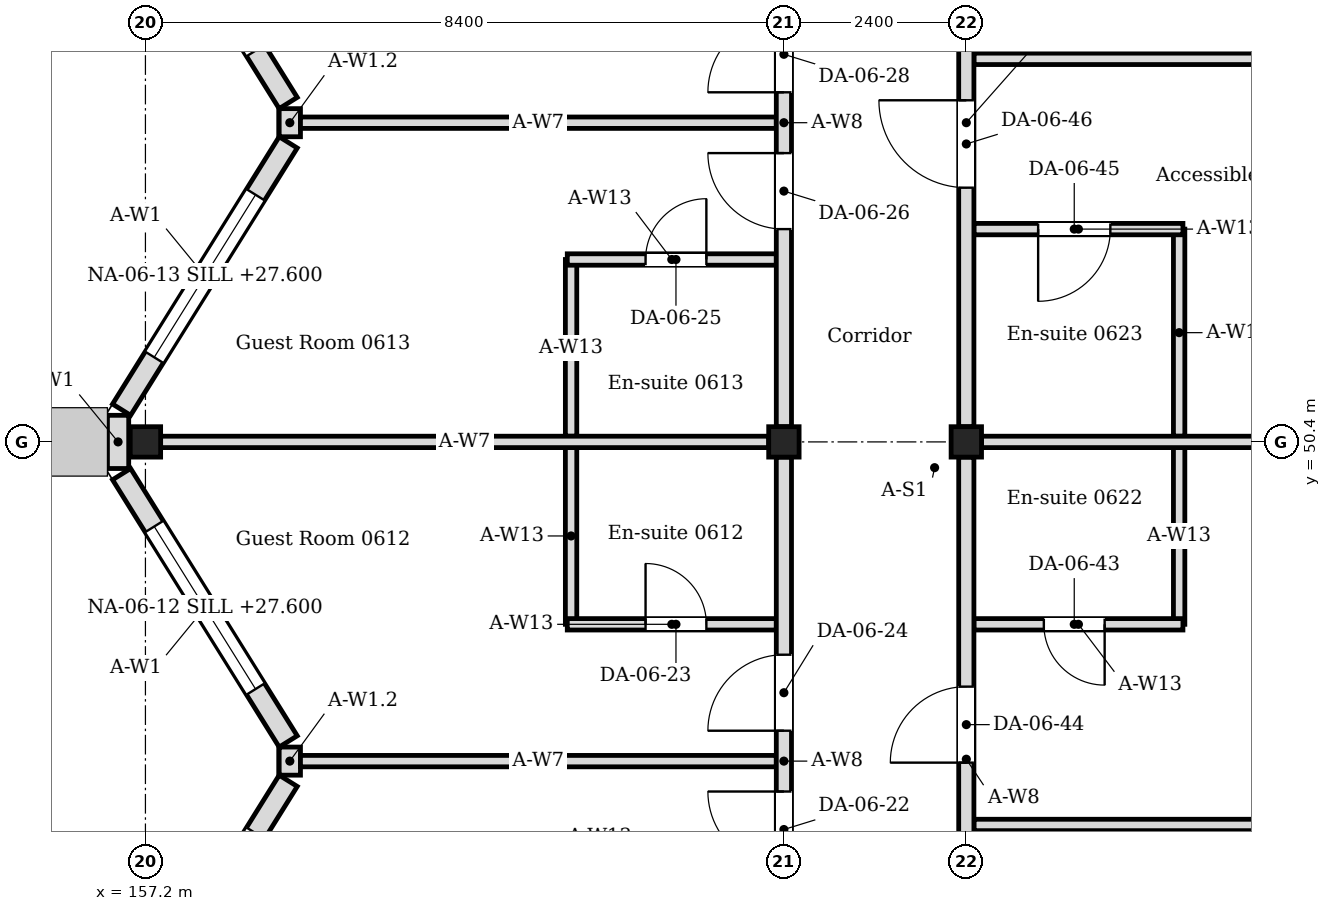
"""IFC4 building model, lengths in metres.
Left out: names, types, materials, properties, quantities, classifications, styles, units other than length and angle.
Written with IfcOpenShell. Run it as: python <this file> out.ifc"""

import sys

from ifc_helpers import new_model, si_unit, direction, frame, frame_2d, origin, origin_2d, place, context, subcontext, project, spatial, rectangle, i_section, extrude, element, fill, save


model = new_model("IFC4")
c1 = context("Model", 3, precision=1e-05, world=origin(), true_north=direction((0.0, 1.0)))
c2 = subcontext(c1, "Body", "Model", "MODEL_VIEW")
j1 = project(units=[si_unit("LENGTHUNIT", "METRE"), si_unit("PLANEANGLEUNIT", "RADIAN")], contexts=[c1])
p1 = place(None, origin())
s1 = spatial("IfcSite", under=j1, at=p1, CompositionType="ELEMENT")
p2 = place(p1, origin())
s2 = spatial("IfcBuilding", under=s1, at=p2, CompositionType="ELEMENT")
p3 = place(p2, frame((0.0, 0.0, 27.0)))
s3 = spatial("IfcBuildingStorey", under=s2, at=p3, CompositionType="ELEMENT", Elevation=27.0)
for number, where, z_axis, x_axis in (
    (1, (157.2, 50.4, 0.0), (0.0, 0.0, 1.0), (1.0, 0.0, 0.0)),
    (2, (165.6, 50.4, 0.0), (0.0, 0.0, 1.0), (1.0, 0.0, 0.0)),
    (3, (168.0, 50.4, 0.0), (0.0, 0.0, 1.0), (1.0, 0.0, 0.0)),
):
    element("IfcColumn", number, at=place(p3, frame(where, z_axis=z_axis, x_axis=x_axis)), inside=s3, PredefinedType="COLUMN", context=c2, shape_type="SweptSolid", body=[
        extrude(i_section(OverallWidth=0.4, OverallDepth=0.4, WebThickness=0.013, FlangeThickness=0.021, FilletRadius=0.022, at=origin_2d()), origin(), (0.0, 0.0, 1.0), 4.2),
    ])
p4 = place(p3, frame((156.886, 42.424, 0.0), z_axis=(0.0, 0.0, 1.0), x_axis=(0.529018946142, 0.848610013271, 0.0)))
e4 = element("IfcWall", 4, at=p4, inside=s3, PredefinedType="SOLIDWALL", context=c2, shape_type="SweptSolid", body=[
    extrude(rectangle(XDim=4.144, YDim=0.28, at=frame_2d((2.072, 0.0))), origin(), (0.0, 0.0, 1.0), 4.05),
])
p5 = place(p4, frame((0.812, 0.0, 0.6)))
e5 = element("IfcOpeningElement", 5, at=p5, cuts=e4, PredefinedType="OPENING", context=c2, shape_type="SweptSolid", body=[
    extrude(rectangle(XDim=2.52, YDim=2.4, at=frame_2d((1.26, 1.2))), frame((0.0, 0.15, 0.0), z_axis=(0.0, -1.0, 0.0), x_axis=(1.0, 0.0, 0.0)), (0.0, 0.0, 1.0), 0.3),
])
p6 = place(p3, frame((159.079, 46.459, 0.0), z_axis=(0.0, 0.0, 1.0), x_axis=(-0.529018946142, 0.848610013271, 0.0)))
e6 = element("IfcWall", 6, at=p6, inside=s3, PredefinedType="SOLIDWALL", context=c2, shape_type="SweptSolid", body=[
    extrude(rectangle(XDim=4.144, YDim=0.28, at=frame_2d((2.072, 0.0))), origin(), (0.0, 0.0, 1.0), 4.05),
])
p7 = place(p6, frame((0.812, 0.0, 0.6)))
e7 = element("IfcOpeningElement", 7, at=p7, cuts=e6, PredefinedType="OPENING", context=c2, shape_type="SweptSolid", body=[
    extrude(rectangle(XDim=2.52, YDim=2.4, at=frame_2d((1.26, 1.2))), frame((0.0, 0.15, 0.0), z_axis=(0.0, -1.0, 0.0), x_axis=(1.0, 0.0, 0.0)), (0.0, 0.0, 1.0), 0.3),
])
p8 = place(p3, frame((159.1, 46.015, 0.0), z_axis=(0.0, 0.0, 1.0), x_axis=(0.0, 1.0, 0.0)))
e8 = element("IfcWall", 8, at=p8, inside=s3, PredefinedType="SOLIDWALL", context=c2, shape_type="SweptSolid", body=[
    extrude(rectangle(XDim=0.37, YDim=0.28, at=frame_2d((0.185, 0.0))), origin(), (0.0, 0.0, 1.0), 3.604),
])
p9 = place(p3, frame((156.84, 50.05, 0.0), z_axis=(0.0, 0.0, 1.0), x_axis=(0.0, 1.0, 0.0)))
e9 = element("IfcWall", 9, at=p9, inside=s3, PredefinedType="SOLIDWALL", context=c2, shape_type="SweptSolid", body=[
    extrude(rectangle(XDim=0.7, YDim=0.28, at=frame_2d((0.35, 0.0))), origin(), (0.0, 0.0, 1.0), 4.05),
])
p10 = place(p3, frame((156.886, 50.824, 0.0), z_axis=(0.0, 0.0, 1.0), x_axis=(0.529018946142, 0.848610013271, 0.0)))
e10 = element("IfcWall", 10, at=p10, inside=s3, PredefinedType="SOLIDWALL", context=c2, shape_type="SweptSolid", body=[
    extrude(rectangle(XDim=4.144, YDim=0.28, at=frame_2d((2.072, 0.0))), origin(), (0.0, 0.0, 1.0), 4.05),
])
p11 = place(p10, frame((0.812, 0.0, 0.6)))
e11 = element("IfcOpeningElement", 11, at=p11, cuts=e10, PredefinedType="OPENING", context=c2, shape_type="SweptSolid", body=[
    extrude(rectangle(XDim=2.52, YDim=2.4, at=frame_2d((1.26, 1.2))), frame((0.0, 0.15, 0.0), z_axis=(0.0, -1.0, 0.0), x_axis=(1.0, 0.0, 0.0)), (0.0, 0.0, 1.0), 0.3),
])
p12 = place(p3, frame((159.079, 54.859, 0.0), z_axis=(0.0, 0.0, 1.0), x_axis=(-0.528992500338, 0.848626498871, 0.0)))
e12 = element("IfcWall", 12, at=p12, inside=s3, PredefinedType="SOLIDWALL", context=c2, shape_type="SweptSolid", body=[
    extrude(rectangle(XDim=4.145, YDim=0.28, at=frame_2d((2.072, 0.0))), origin(), (0.0, 0.0, 1.0), 4.05),
])
p13 = place(p12, frame((0.812, 0.0, 0.6)))
e13 = element("IfcOpeningElement", 13, at=p13, cuts=e12, PredefinedType="OPENING", context=c2, shape_type="SweptSolid", body=[
    extrude(rectangle(XDim=2.52, YDim=2.4, at=frame_2d((1.26, 1.2))), frame((0.0, 0.15, 0.0), z_axis=(0.0, -1.0, 0.0), x_axis=(1.0, 0.0, 0.0)), (0.0, 0.0, 1.0), 0.3),
])
p14 = place(p3, frame((159.1, 54.415, 0.0), z_axis=(0.0, 0.0, 1.0), x_axis=(0.0, 1.0, 0.0)))
e14 = element("IfcWall", 14, at=p14, inside=s3, PredefinedType="SOLIDWALL", context=c2, shape_type="SweptSolid", body=[
    extrude(rectangle(XDim=0.37, YDim=0.28, at=frame_2d((0.185, 0.0))), origin(), (0.0, 0.0, 1.0), 3.604),
])
p15 = place(p3, frame((162.8, 48.0, 0.0), z_axis=(0.0, 0.0, 1.0), x_axis=(0.0, 1.0, 0.0)))
e15 = element("IfcWall", 15, at=p15, inside=s3, PredefinedType="PARTITIONING", context=c2, shape_type="SweptSolid", body=[
    extrude(rectangle(XDim=2.325, YDim=0.15, at=frame_2d((1.163, 0.0))), origin(), (0.0, 0.0, 1.0), 4.05),
])
p16 = place(p3, frame((162.75, 48.0, 0.0), z_axis=(0.0, 0.0, 1.0), x_axis=(1.0, 0.0, 0.0)))
e16 = element("IfcWall", 16, at=p16, inside=s3, PredefinedType="PARTITIONING", context=c2, shape_type="SweptSolid", body=[
    extrude(rectangle(XDim=2.75, YDim=0.15, at=frame_2d((1.375, 0.0))), origin(), (0.0, 0.0, 1.0), 4.05),
])
p17 = place(p16, frame((1.03, 0.0, 0.0)))
e17 = element("IfcOpeningElement", 17, at=p17, cuts=e16, PredefinedType="OPENING", context=c2, shape_type="SweptSolid", body=[
    extrude(rectangle(XDim=0.8, YDim=2.1, at=frame_2d((0.4, 1.05))), frame((0.0, 0.085, 0.0), z_axis=(0.0, -1.0, 0.0), x_axis=(1.0, 0.0, 0.0)), (0.0, 0.0, 1.0), 0.17),
])
p18 = place(p3, frame((162.8, 50.475, 0.0), z_axis=(0.0, 0.0, 1.0), x_axis=(0.0, 1.0, 0.0)))
e18 = element("IfcWall", 18, at=p18, inside=s3, PredefinedType="PARTITIONING", context=c2, shape_type="SweptSolid", body=[
    extrude(rectangle(XDim=2.325, YDim=0.15, at=frame_2d((1.163, 0.0))), origin(), (0.0, 0.0, 1.0), 4.05),
])
p19 = place(p3, frame((162.75, 52.8, 0.0), z_axis=(0.0, 0.0, 1.0), x_axis=(1.0, 0.0, 0.0)))
e19 = element("IfcWall", 19, at=p19, inside=s3, PredefinedType="PARTITIONING", context=c2, shape_type="SweptSolid", body=[
    extrude(rectangle(XDim=2.75, YDim=0.15, at=frame_2d((1.375, 0.0))), origin(), (0.0, 0.0, 1.0), 4.05),
])
p20 = place(p19, frame((1.03, 0.0, 0.0)))
e20 = element("IfcOpeningElement", 20, at=p20, cuts=e19, PredefinedType="OPENING", context=c2, shape_type="SweptSolid", body=[
    extrude(rectangle(XDim=0.8, YDim=2.1, at=frame_2d((0.4, 1.05))), frame((0.0, 0.085, 0.0), z_axis=(0.0, -1.0, 0.0), x_axis=(1.0, 0.0, 0.0)), (0.0, 0.0, 1.0), 0.17),
])
p21 = place(p3, frame((170.8, 48.0, 0.0), z_axis=(0.0, 0.0, 1.0), x_axis=(0.0, 1.0, 0.0)))
e21 = element("IfcWall", 21, at=p21, inside=s3, PredefinedType="PARTITIONING", context=c2, shape_type="SweptSolid", body=[
    extrude(rectangle(XDim=2.325, YDim=0.15, at=frame_2d((1.163, 0.0))), origin(), (0.0, 0.0, 1.0), 4.05),
])
p22 = place(p3, frame((170.85, 48.0, 0.0), z_axis=(0.0, 0.0, 1.0), x_axis=(-1.0, 0.0, 0.0)))
e22 = element("IfcWall", 22, at=p22, inside=s3, PredefinedType="PARTITIONING", context=c2, shape_type="SweptSolid", body=[
    extrude(rectangle(XDim=2.75, YDim=0.15, at=frame_2d((1.375, 0.0))), origin(), (0.0, 0.0, 1.0), 4.05),
])
p23 = place(p22, frame((1.03, 0.0, 0.0)))
e23 = element("IfcOpeningElement", 23, at=p23, cuts=e22, PredefinedType="OPENING", context=c2, shape_type="SweptSolid", body=[
    extrude(rectangle(XDim=0.8, YDim=2.1, at=frame_2d((0.4, 1.05))), frame((0.0, 0.085, 0.0), z_axis=(0.0, -1.0, 0.0), x_axis=(1.0, 0.0, 0.0)), (0.0, 0.0, 1.0), 0.17),
])
p24 = place(p3, frame((170.8, 50.475, 0.0), z_axis=(0.0, 0.0, 1.0), x_axis=(0.0, 1.0, 0.0)))
e24 = element("IfcWall", 24, at=p24, inside=s3, PredefinedType="PARTITIONING", context=c2, shape_type="SweptSolid", body=[
    extrude(rectangle(XDim=2.725, YDim=0.15, at=frame_2d((1.362, 0.0))), origin(), (0.0, 0.0, 1.0), 4.05),
])
p25 = place(p3, frame((170.85, 53.2, 0.0), z_axis=(0.0, 0.0, 1.0), x_axis=(-1.0, 0.0, 0.0)))
e25 = element("IfcWall", 25, at=p25, inside=s3, PredefinedType="PARTITIONING", context=c2, shape_type="SweptSolid", body=[
    extrude(rectangle(XDim=2.75, YDim=0.15, at=frame_2d((1.375, 0.0))), origin(), (0.0, 0.0, 1.0), 4.05),
])
p26 = place(p25, frame((0.955, 0.0, 0.0)))
e26 = element("IfcOpeningElement", 26, at=p26, cuts=e25, PredefinedType="OPENING", context=c2, shape_type="SweptSolid", body=[
    extrude(rectangle(XDim=0.95, YDim=2.1, at=frame_2d((0.475, 1.05))), frame((0.0, 0.085, 0.0), z_axis=(0.0, -1.0, 0.0), x_axis=(1.0, 0.0, 0.0)), (0.0, 0.0, 1.0), 0.17),
])
for number, where, z_axis, x_axis in (
    (27, (157.4, 50.4, 0.0), (0.0, 0.0, 1.0), (1.0, 0.0, 0.0)),
    (28, (168.2, 50.4, 0.0), (0.0, 0.0, 1.0), (1.0, 0.0, 0.0)),
):
    element("IfcWall", number, at=place(p3, frame(where, z_axis=z_axis, x_axis=x_axis)), inside=s3, PredefinedType="PARTITIONING", context=c2, shape_type="SweptSolid", body=[
        extrude(rectangle(XDim=8.0, YDim=0.15, at=frame_2d((4.0, 0.0))), origin(), (0.0, 0.0, 1.0), 3.604),
    ])
for number, where, z_axis, x_axis in (
    (29, (159.24, 46.2, 0.0), (0.0, 0.0, 1.0), (1.0, 0.0, 0.0)),
    (30, (159.24, 54.6, 0.0), (0.0, 0.0, 1.0), (1.0, 0.0, 0.0)),
):
    element("IfcWall", number, at=place(p3, frame(where, z_axis=z_axis, x_axis=x_axis)), inside=s3, PredefinedType="PARTITIONING", context=c2, shape_type="SweptSolid", body=[
        extrude(rectangle(XDim=6.26, YDim=0.15, at=frame_2d((3.13, 0.0))), origin(), (0.0, 0.0, 1.0), 3.604),
    ])
for number, where, z_axis, x_axis in (
    (31, (168.1, 45.36, 0.0), (0.0, 0.0, 1.0), (1.0, 0.0, 0.0)),
    (32, (168.1, 55.44, 0.0), (0.0, 0.0, 1.0), (1.0, 0.0, 0.0)),
):
    element("IfcWall", number, at=place(p3, frame(where, z_axis=z_axis, x_axis=x_axis)), inside=s3, PredefinedType="PARTITIONING", context=c2, shape_type="SweptSolid", body=[
        extrude(rectangle(XDim=8.52, YDim=0.15, at=frame_2d((4.26, 0.0))), origin(), (0.0, 0.0, 1.0), 3.604),
    ])
p27 = place(p3, frame((165.6, 42.2, 0.0), z_axis=(0.0, 0.0, 1.0), x_axis=(0.0, 1.0, 0.0)))
e33 = element("IfcWall", 33, at=p27, inside=s3, PredefinedType="PARTITIONING", context=c2, shape_type="SweptSolid", body=[
    extrude(rectangle(XDim=8.0, YDim=0.2, at=frame_2d((4.0, 0.0))), origin(), (0.0, 0.0, 1.0), 3.45),
])
p28 = place(p27, frame((2.6, 0.0, 0.0)))
e34 = element("IfcOpeningElement", 34, at=p28, cuts=e33, PredefinedType="OPENING", context=c2, shape_type="SweptSolid", body=[
    extrude(rectangle(XDim=1.0, YDim=2.4, at=frame_2d((0.5, 1.2))), frame((0.0, 0.11, 0.0), z_axis=(0.0, -1.0, 0.0), x_axis=(1.0, 0.0, 0.0)), (0.0, 0.0, 1.0), 0.22),
])
p29 = place(p27, frame((4.4, 0.0, 0.0)))
e35 = element("IfcOpeningElement", 35, at=p29, cuts=e33, PredefinedType="OPENING", context=c2, shape_type="SweptSolid", body=[
    extrude(rectangle(XDim=1.0, YDim=2.4, at=frame_2d((0.5, 1.2))), frame((0.0, 0.11, 0.0), z_axis=(0.0, -1.0, 0.0), x_axis=(1.0, 0.0, 0.0)), (0.0, 0.0, 1.0), 0.22),
])
p30 = place(p3, frame((165.6, 50.6, 0.0), z_axis=(0.0, 0.0, 1.0), x_axis=(0.0, 1.0, 0.0)))
e36 = element("IfcWall", 36, at=p30, inside=s3, PredefinedType="PARTITIONING", context=c2, shape_type="SweptSolid", body=[
    extrude(rectangle(XDim=8.0, YDim=0.2, at=frame_2d((4.0, 0.0))), origin(), (0.0, 0.0, 1.0), 3.45),
])
p31 = place(p30, frame((2.6, 0.0, 0.0)))
e37 = element("IfcOpeningElement", 37, at=p31, cuts=e36, PredefinedType="OPENING", context=c2, shape_type="SweptSolid", body=[
    extrude(rectangle(XDim=1.0, YDim=2.4, at=frame_2d((0.5, 1.2))), frame((0.0, 0.11, 0.0), z_axis=(0.0, -1.0, 0.0), x_axis=(1.0, 0.0, 0.0)), (0.0, 0.0, 1.0), 0.22),
])
p32 = place(p30, frame((4.4, 0.0, 0.0)))
e38 = element("IfcOpeningElement", 38, at=p32, cuts=e36, PredefinedType="OPENING", context=c2, shape_type="SweptSolid", body=[
    extrude(rectangle(XDim=1.0, YDim=2.4, at=frame_2d((0.5, 1.2))), frame((0.0, 0.11, 0.0), z_axis=(0.0, -1.0, 0.0), x_axis=(1.0, 0.0, 0.0)), (0.0, 0.0, 1.0), 0.22),
])
p33 = place(p3, frame((168.0, 42.25, 0.0), z_axis=(0.0, 0.0, 1.0), x_axis=(0.0, 1.0, 0.0)))
e39 = element("IfcWall", 39, at=p33, inside=s3, PredefinedType="PARTITIONING", context=c2, shape_type="SweptSolid", body=[
    extrude(rectangle(XDim=7.95, YDim=0.2, at=frame_2d((3.975, 0.0))), origin(), (0.0, 0.0, 1.0), 3.45),
])
p34 = place(p33, frame((1.93, 0.0, 0.0)))
e40 = element("IfcOpeningElement", 40, at=p34, cuts=e39, PredefinedType="OPENING", context=c2, shape_type="SweptSolid", body=[
    extrude(rectangle(XDim=1.0, YDim=2.4, at=frame_2d((0.5, 1.2))), frame((0.0, 0.11, 0.0), z_axis=(0.0, -1.0, 0.0), x_axis=(1.0, 0.0, 0.0)), (0.0, 0.0, 1.0), 0.22),
])
p35 = place(p33, frame((3.93, 0.0, 0.0)))
e41 = element("IfcOpeningElement", 41, at=p35, cuts=e39, PredefinedType="OPENING", context=c2, shape_type="SweptSolid", body=[
    extrude(rectangle(XDim=1.0, YDim=2.4, at=frame_2d((0.5, 1.2))), frame((0.0, 0.11, 0.0), z_axis=(0.0, -1.0, 0.0), x_axis=(1.0, 0.0, 0.0)), (0.0, 0.0, 1.0), 0.22),
])
p36 = place(p3, frame((168.0, 50.6, 0.0), z_axis=(0.0, 0.0, 1.0), x_axis=(0.0, 1.0, 0.0)))
e42 = element("IfcWall", 42, at=p36, inside=s3, PredefinedType="PARTITIONING", context=c2, shape_type="SweptSolid", body=[
    extrude(rectangle(XDim=8.0, YDim=0.2, at=frame_2d((4.0, 0.0))), origin(), (0.0, 0.0, 1.0), 3.45),
])
p37 = place(p36, frame((3.145, 0.0, 0.0)))
e43 = element("IfcOpeningElement", 43, at=p37, cuts=e42, PredefinedType="OPENING", context=c2, shape_type="SweptSolid", body=[
    extrude(rectangle(XDim=1.15, YDim=2.1, at=frame_2d((0.575, 1.05))), frame((0.0, 0.11, 0.0), z_axis=(0.0, -1.0, 0.0), x_axis=(1.0, 0.0, 0.0)), (0.0, 0.0, 1.0), 0.22),
])
p38 = place(p36, frame((5.02, 0.0, 0.0)))
e44 = element("IfcOpeningElement", 44, at=p38, cuts=e42, PredefinedType="OPENING", context=c2, shape_type="SweptSolid", body=[
    extrude(rectangle(XDim=1.0, YDim=2.4, at=frame_2d((0.5, 1.2))), frame((0.0, 0.11, 0.0), z_axis=(0.0, -1.0, 0.0), x_axis=(1.0, 0.0, 0.0)), (0.0, 0.0, 1.0), 0.22),
])
p39 = place(p7, origin())
e45 = element("IfcWindow", 45, at=p39, inside=s3, PartitioningType="SINGLE_PANEL", PredefinedType="WINDOW", context=c2, shape_type="SweptSolid", body=[
    extrude(rectangle(XDim=2.52, YDim=2.4, at=frame_2d((1.26, 1.2))), frame((0.0, 0.03, 0.0), z_axis=(0.0, -1.0, 0.0), x_axis=(1.0, 0.0, 0.0)), (0.0, 0.0, 1.0), 0.06),
])
fill(e7, e45)
p40 = place(p11, origin())
e46 = element("IfcWindow", 46, at=p40, inside=s3, PartitioningType="SINGLE_PANEL", PredefinedType="WINDOW", context=c2, shape_type="SweptSolid", body=[
    extrude(rectangle(XDim=2.52, YDim=2.4, at=frame_2d((1.26, 1.2))), frame((0.0, 0.03, 0.0), z_axis=(0.0, -1.0, 0.0), x_axis=(1.0, 0.0, 0.0)), (0.0, 0.0, 1.0), 0.06),
])
fill(e11, e46)
p41 = place(p28, origin())
e47 = element("IfcDoor", 47, at=p41, inside=s3, OperationType="SINGLE_SWING_RIGHT", PredefinedType="DOOR", context=c2, shape_type="SweptSolid", body=[
    extrude(rectangle(XDim=1.0, YDim=2.4, at=frame_2d((0.5, 1.2))), frame((0.0, 0.025, 0.0), z_axis=(0.0, -1.0, 0.0), x_axis=(1.0, 0.0, 0.0)), (0.0, 0.0, 1.0), 0.05),
])
fill(e34, e47)
p42 = place(p17, origin())
e48 = element("IfcDoor", 48, at=p42, inside=s3, OperationType="SINGLE_SWING_LEFT", PredefinedType="DOOR", context=c2, shape_type="SweptSolid", body=[
    extrude(rectangle(XDim=0.8, YDim=2.1, at=frame_2d((0.4, 1.05))), frame((0.0, 0.025, 0.0), z_axis=(0.0, -1.0, 0.0), x_axis=(1.0, 0.0, 0.0)), (0.0, 0.0, 1.0), 0.05),
])
fill(e17, e48)
p43 = place(p29, origin())
e49 = element("IfcDoor", 49, at=p43, inside=s3, OperationType="SINGLE_SWING_LEFT", PredefinedType="DOOR", context=c2, shape_type="SweptSolid", body=[
    extrude(rectangle(XDim=1.0, YDim=2.4, at=frame_2d((0.5, 1.2))), frame((0.0, 0.025, 0.0), z_axis=(0.0, -1.0, 0.0), x_axis=(1.0, 0.0, 0.0)), (0.0, 0.0, 1.0), 0.05),
])
fill(e35, e49)
p44 = place(p20, origin())
e50 = element("IfcDoor", 50, at=p44, inside=s3, OperationType="SINGLE_SWING_RIGHT", PredefinedType="DOOR", context=c2, shape_type="SweptSolid", body=[
    extrude(rectangle(XDim=0.8, YDim=2.1, at=frame_2d((0.4, 1.05))), frame((0.0, 0.025, 0.0), z_axis=(0.0, -1.0, 0.0), x_axis=(1.0, 0.0, 0.0)), (0.0, 0.0, 1.0), 0.05),
])
fill(e20, e50)
p45 = place(p31, origin())
e51 = element("IfcDoor", 51, at=p45, inside=s3, OperationType="SINGLE_SWING_RIGHT", PredefinedType="DOOR", context=c2, shape_type="SweptSolid", body=[
    extrude(rectangle(XDim=1.0, YDim=2.4, at=frame_2d((0.5, 1.2))), frame((0.0, 0.025, 0.0), z_axis=(0.0, -1.0, 0.0), x_axis=(1.0, 0.0, 0.0)), (0.0, 0.0, 1.0), 0.05),
])
fill(e37, e51)
p46 = place(p32, origin())
e52 = element("IfcDoor", 52, at=p46, inside=s3, OperationType="SINGLE_SWING_LEFT", PredefinedType="DOOR", context=c2, shape_type="SweptSolid", body=[
    extrude(rectangle(XDim=1.0, YDim=2.4, at=frame_2d((0.5, 1.2))), frame((0.0, 0.025, 0.0), z_axis=(0.0, -1.0, 0.0), x_axis=(1.0, 0.0, 0.0)), (0.0, 0.0, 1.0), 0.05),
])
fill(e38, e52)
p47 = place(p23, origin())
e53 = element("IfcDoor", 53, at=p47, inside=s3, OperationType="SINGLE_SWING_LEFT", PredefinedType="DOOR", context=c2, shape_type="SweptSolid", body=[
    extrude(rectangle(XDim=0.8, YDim=2.1, at=frame_2d((0.4, 1.05))), frame((0.0, 0.025, 0.0), z_axis=(0.0, -1.0, 0.0), x_axis=(1.0, 0.0, 0.0)), (0.0, 0.0, 1.0), 0.05),
])
fill(e23, e53)
p48 = place(p35, origin())
e54 = element("IfcDoor", 54, at=p48, inside=s3, OperationType="SINGLE_SWING_LEFT", PredefinedType="DOOR", context=c2, shape_type="SweptSolid", body=[
    extrude(rectangle(XDim=1.0, YDim=2.4, at=frame_2d((0.5, 1.2))), frame((0.0, 0.025, 0.0), z_axis=(0.0, -1.0, 0.0), x_axis=(1.0, 0.0, 0.0)), (0.0, 0.0, 1.0), 0.05),
])
fill(e41, e54)
p49 = place(p26, origin())
e55 = element("IfcDoor", 55, at=p49, inside=s3, OperationType="SINGLE_SWING_RIGHT", PredefinedType="DOOR", context=c2, shape_type="SweptSolid", body=[
    extrude(rectangle(XDim=0.95, YDim=2.1, at=frame_2d((0.475, 1.05))), frame((0.0, 0.025, 0.0), z_axis=(0.0, -1.0, 0.0), x_axis=(1.0, 0.0, 0.0)), (0.0, 0.0, 1.0), 0.05),
])
fill(e26, e55)
p50 = place(p37, origin())
e56 = element("IfcDoor", 56, at=p50, inside=s3, OperationType="SINGLE_SWING_RIGHT", PredefinedType="DOOR", context=c2, shape_type="SweptSolid", body=[
    extrude(rectangle(XDim=1.15, YDim=2.1, at=frame_2d((0.575, 1.05))), frame((0.0, 0.025, 0.0), z_axis=(0.0, -1.0, 0.0), x_axis=(1.0, 0.0, 0.0)), (0.0, 0.0, 1.0), 0.05),
])
fill(e43, e56)
save(model, sys.argv[1])
